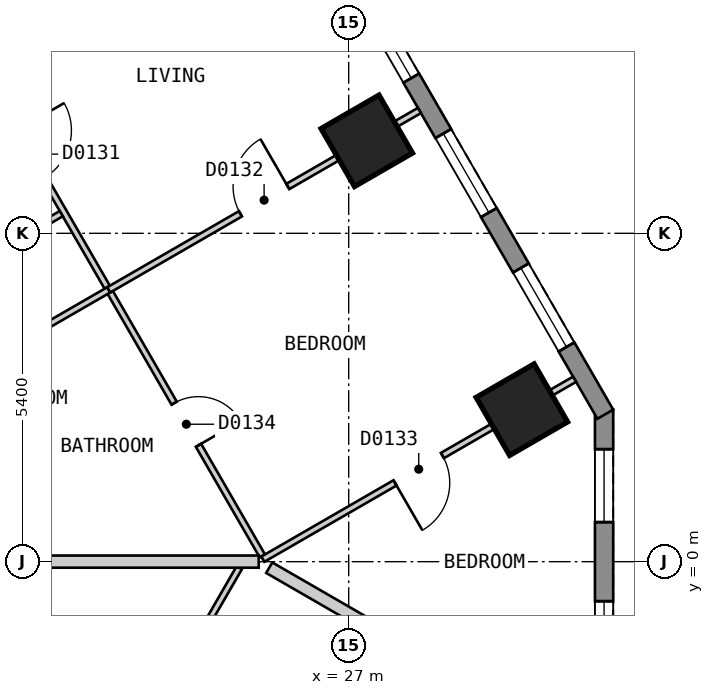
"""IFC4 building model, lengths in metres.
Left out: names, types, materials, properties, quantities, classifications, styles, units other than length and angle.
Written with IfcOpenShell. Run it as: python <this file> out.ifc"""

import sys

from ifc_helpers import new_model, si_unit, direction, frame, frame_2d, origin, origin_2d, place, context, subcontext, project, spatial, polyline, rectangle, outline, extrude, element, fill, save


model = new_model("IFC4")
c1 = context("Model", 3, precision=1e-05, world=origin(), true_north=direction((0.0, 1.0)))
c2 = subcontext(c1, "Body", "Model", "MODEL_VIEW")
j1 = project(units=[si_unit("LENGTHUNIT", "METRE"), si_unit("PLANEANGLEUNIT", "RADIAN")], contexts=[c1])
p1 = place(None, origin())
s1 = spatial("IfcSite", under=j1, at=p1, CompositionType="ELEMENT")
p2 = place(p1, origin())
s2 = spatial("IfcBuilding", under=s1, at=p2, CompositionType="ELEMENT")
p3 = place(p2, frame((0.0, 0.0, 29.4)))
s3 = spatial("IfcBuildingStorey", under=s2, at=p3, CompositionType="ELEMENT", Elevation=29.4)
for number, where, z_axis, x_axis in (
    (1, (29.848, 2.5, 0.0), (0.0, 0.0, 1.0), (-0.5, 0.866, 0.0)),
    (2, (27.297, 6.921, 0.0), (0.0, 0.0, 1.0), (-0.5, 0.866, 0.0)),
):
    element("IfcColumn", number, at=place(p3, frame(where, z_axis=z_axis, x_axis=x_axis)), inside=s3, PredefinedType="COLUMN", context=c2, shape_type="SweptSolid", body=[
        extrude(rectangle(XDim=1.1, YDim=1.1, at=origin_2d()), origin(), (0.0, 0.0, 1.0), 3.0),
    ])
p4 = place(p3, frame((31.2, -2.5, 0.0), z_axis=(0.0, 0.0, 1.0), x_axis=(0.0, 1.0, 0.0)))
e3 = element("IfcWall", 3, at=p4, inside=s3, PredefinedType="SOLIDWALL", context=c2, shape_type="SweptSolid", body=[
    extrude(outline(polyline([(0.0, -0.15), (5.0, -0.15), (4.92, 0.15), (0.08, 0.15), (0.0, -0.15)])), origin(), (0.0, 0.0, 1.0), 2.7),
])
p5 = place(p4, frame((0.65, 0.0, 0.15)))
e4 = element("IfcOpeningElement", 4, at=p5, cuts=e3, PredefinedType="OPENING", context=c2, shape_type="SweptSolid", body=[
    extrude(rectangle(XDim=1.2, YDim=2.1, at=frame_2d((0.6, 1.05))), frame((0.0, 0.16, 0.0), z_axis=(0.0, -1.0, 0.0), x_axis=(1.0, 0.0, 0.0)), (0.0, 0.0, 1.0), 0.32),
])
p6 = place(p4, frame((3.15, 0.0, 0.15)))
e5 = element("IfcOpeningElement", 5, at=p6, cuts=e3, PredefinedType="OPENING", context=c2, shape_type="SweptSolid", body=[
    extrude(rectangle(XDim=1.2, YDim=2.1, at=frame_2d((0.6, 1.05))), frame((0.0, 0.16, 0.0), z_axis=(0.0, -1.0, 0.0), x_axis=(1.0, 0.0, 0.0)), (0.0, 0.0, 1.0), 0.32),
])
p7 = place(p3, frame((31.22, 2.425, 0.0), z_axis=(0.0, 0.0, 1.0), x_axis=(-0.500001938803, 0.866024284413, 0.0)))
e6 = element("IfcWall", 6, at=p7, inside=s3, PredefinedType="SOLIDWALL", context=c2, shape_type="SweptSolid", body=[
    extrude(outline(polyline([(0.0, -0.15), (27.02, -0.15), (26.94, 0.15), (0.08, 0.15), (0.0, -0.15)])), origin(), (0.0, 0.0, 1.0), 2.7),
])
p8 = place(p7, frame((1.277, 0.0, 0.15)))
e7 = element("IfcOpeningElement", 7, at=p8, cuts=e6, PredefinedType="OPENING", context=c2, shape_type="SweptSolid", body=[
    extrude(rectangle(XDim=1.5, YDim=2.1, at=frame_2d((0.75, 1.05))), frame((0.0, 0.16, 0.0), z_axis=(0.0, -1.0, 0.0), x_axis=(1.0, 0.0, 0.0)), (0.0, 0.0, 1.0), 0.32),
])
p9 = place(p7, frame((3.829, 0.0, 0.15)))
e8 = element("IfcOpeningElement", 8, at=p9, cuts=e6, PredefinedType="OPENING", context=c2, shape_type="SweptSolid", body=[
    extrude(rectangle(XDim=1.5, YDim=2.1, at=frame_2d((0.75, 1.05))), frame((0.0, 0.16, 0.0), z_axis=(0.0, -1.0, 0.0), x_axis=(1.0, 0.0, 0.0)), (0.0, 0.0, 1.0), 0.32),
])
p10 = place(p7, frame((6.382, 0.0, 0.15)))
e9 = element("IfcOpeningElement", 9, at=p10, cuts=e6, PredefinedType="OPENING", context=c2, shape_type="SweptSolid", body=[
    extrude(rectangle(XDim=1.5, YDim=2.1, at=frame_2d((0.75, 1.05))), frame((0.0, 0.16, 0.0), z_axis=(0.0, -1.0, 0.0), x_axis=(1.0, 0.0, 0.0)), (0.0, 0.0, 1.0), 0.32),
])
p11 = place(p7, frame((8.933, 0.0, 0.15)))
e10 = element("IfcOpeningElement", 10, at=p11, cuts=e6, PredefinedType="OPENING", context=c2, shape_type="SweptSolid", body=[
    extrude(rectangle(XDim=1.5, YDim=2.1, at=frame_2d((0.75, 1.05))), frame((0.0, 0.16, 0.0), z_axis=(0.0, -1.0, 0.0), x_axis=(1.0, 0.0, 0.0)), (0.0, 0.0, 1.0), 0.32),
])
p12 = place(p7, frame((11.485, 0.0, 0.15)))
e11 = element("IfcOpeningElement", 11, at=p12, cuts=e6, PredefinedType="OPENING", context=c2, shape_type="SweptSolid", body=[
    extrude(rectangle(XDim=1.5, YDim=2.1, at=frame_2d((0.75, 1.05))), frame((0.0, 0.16, 0.0), z_axis=(0.0, -1.0, 0.0), x_axis=(1.0, 0.0, 0.0)), (0.0, 0.0, 1.0), 0.32),
])
p13 = place(p7, frame((14.037, 0.0, 0.15)))
e12 = element("IfcOpeningElement", 12, at=p13, cuts=e6, PredefinedType="OPENING", context=c2, shape_type="SweptSolid", body=[
    extrude(rectangle(XDim=1.5, YDim=2.1, at=frame_2d((0.75, 1.05))), frame((0.0, 0.16, 0.0), z_axis=(0.0, -1.0, 0.0), x_axis=(1.0, 0.0, 0.0)), (0.0, 0.0, 1.0), 0.32),
])
p14 = place(p7, frame((16.589, 0.0, 0.15)))
e13 = element("IfcOpeningElement", 13, at=p14, cuts=e6, PredefinedType="OPENING", context=c2, shape_type="SweptSolid", body=[
    extrude(rectangle(XDim=1.5, YDim=2.1, at=frame_2d((0.75, 1.05))), frame((0.0, 0.16, 0.0), z_axis=(0.0, -1.0, 0.0), x_axis=(1.0, 0.0, 0.0)), (0.0, 0.0, 1.0), 0.32),
])
p15 = place(p7, frame((19.141, 0.0, 0.15)))
e14 = element("IfcOpeningElement", 14, at=p15, cuts=e6, PredefinedType="OPENING", context=c2, shape_type="SweptSolid", body=[
    extrude(rectangle(XDim=1.5, YDim=2.1, at=frame_2d((0.75, 1.05))), frame((0.0, 0.16, 0.0), z_axis=(0.0, -1.0, 0.0), x_axis=(1.0, 0.0, 0.0)), (0.0, 0.0, 1.0), 0.32),
])
p16 = place(p7, frame((21.693, 0.0, 0.15)))
e15 = element("IfcOpeningElement", 15, at=p16, cuts=e6, PredefinedType="OPENING", context=c2, shape_type="SweptSolid", body=[
    extrude(rectangle(XDim=1.5, YDim=2.1, at=frame_2d((0.75, 1.05))), frame((0.0, 0.16, 0.0), z_axis=(0.0, -1.0, 0.0), x_axis=(1.0, 0.0, 0.0)), (0.0, 0.0, 1.0), 0.32),
])
p17 = place(p7, frame((24.244, 0.0, 0.15)))
e16 = element("IfcOpeningElement", 16, at=p17, cuts=e6, PredefinedType="OPENING", context=c2, shape_type="SweptSolid", body=[
    extrude(rectangle(XDim=1.5, YDim=2.1, at=frame_2d((0.75, 1.05))), frame((0.0, 0.16, 0.0), z_axis=(0.0, -1.0, 0.0), x_axis=(1.0, 0.0, 0.0)), (0.0, 0.0, 1.0), 0.32),
])
p18 = place(p3, frame((20.551, 8.805, 0.0), z_axis=(0.0, 0.0, 1.0), x_axis=(0.499984387913, -0.86603441724, 0.0)))
e17 = element("IfcWall", 17, at=p18, inside=s3, PredefinedType="PARTITIONING", context=c2, shape_type="SweptSolid", body=[
    extrude(rectangle(XDim=10.058, YDim=0.1, at=frame_2d((5.029, 0.0))), origin(), (0.0, 0.0, 1.0), 2.7),
])
p19 = place(p18, frame((1.978, 0.0, 0.0)))
e18 = element("IfcOpeningElement", 18, at=p19, cuts=e17, PredefinedType="OPENING", context=c2, shape_type="SweptSolid", body=[
    extrude(rectangle(XDim=0.9, YDim=2.1, at=frame_2d((0.45, 1.05))), frame((0.0, 0.06, 0.0), z_axis=(0.0, -1.0, 0.0), x_axis=(1.0, 0.0, 0.0)), (0.0, 0.0, 1.0), 0.12),
])
p20 = place(p18, frame((7.157, 0.0, 0.0)))
e19 = element("IfcOpeningElement", 19, at=p20, cuts=e17, PredefinedType="OPENING", context=c2, shape_type="SweptSolid", body=[
    extrude(rectangle(XDim=0.8, YDim=2.1, at=frame_2d((0.4, 1.05))), frame((0.0, 0.06, 0.0), z_axis=(0.0, -1.0, 0.0), x_axis=(1.0, 0.0, 0.0)), (0.0, 0.0, 1.0), 0.12),
])
p21 = place(p3, frame((22.797, -4.263, 0.0), z_axis=(0.0, 0.0, 1.0), x_axis=(0.499820637322, 0.866128934112, 0.0)))
e20 = element("IfcWall", 20, at=p21, inside=s3, PredefinedType="PARTITIONING", context=c2, shape_type="SweptSolid", body=[
    extrude(rectangle(XDim=4.807, YDim=0.1, at=frame_2d((2.404, 0.0))), origin(), (0.0, 0.0, 1.0), 2.7),
])
p22 = place(p21, frame((2.037, 0.0, 0.0)))
e21 = element("IfcOpeningElement", 21, at=p22, cuts=e20, PredefinedType="OPENING", context=c2, shape_type="SweptSolid", body=[
    extrude(rectangle(XDim=0.8, YDim=2.1, at=frame_2d((0.4, 1.05))), frame((0.0, 0.06, 0.0), z_axis=(0.0, -1.0, 0.0), x_axis=(1.0, 0.0, 0.0)), (0.0, 0.0, 1.0), 0.12),
])
p23 = place(p3, frame((19.503, 2.421, 0.0), z_axis=(0.0, 0.0, 1.0), x_axis=(0.866083434238, 0.499899474834, 0.0)))
e22 = element("IfcWall", 22, at=p23, inside=s3, PredefinedType="PARTITIONING", context=c2, shape_type="SweptSolid", body=[
    extrude(rectangle(XDim=4.099, YDim=0.1, at=frame_2d((2.049, 0.0))), origin(), (0.0, 0.0, 1.0), 2.7),
])
p24 = place(p3, frame((25.588, 0.041, 0.0), z_axis=(0.0, 0.0, 1.0), x_axis=(0.866113484451, 0.499847408768, 0.0)))
e23 = element("IfcWall", 23, at=p24, inside=s3, PredefinedType="PARTITIONING", context=c2, shape_type="SweptSolid", body=[
    extrude(rectangle(XDim=5.92, YDim=0.1, at=frame_2d((2.96, 0.0))), origin(), (0.0, 0.0, 1.0), 2.7),
])
p25 = place(p24, frame((2.51, 0.0, 0.0)))
e24 = element("IfcOpeningElement", 24, at=p25, cuts=e23, PredefinedType="OPENING", context=c2, shape_type="SweptSolid", body=[
    extrude(rectangle(XDim=0.9, YDim=2.1, at=frame_2d((0.45, 1.05))), frame((0.0, 0.06, 0.0), z_axis=(0.0, -1.0, 0.0), x_axis=(1.0, 0.0, 0.0)), (0.0, 0.0, 1.0), 0.12),
])
p26 = place(p3, frame((18.788, 3.658, 0.0), z_axis=(0.0, 0.0, 1.0), x_axis=(0.860114269096, 0.510101405701, 0.0)))
e25 = element("IfcWall", 25, at=p26, inside=s3, PredefinedType="PARTITIONING", context=c2, shape_type="SweptSolid", body=[
    extrude(rectangle(XDim=4.051, YDim=0.1, at=frame_2d((2.025, 0.0))), origin(), (0.0, 0.0, 1.0), 2.7),
])
p27 = place(p26, frame((1.6, 0.0, 0.0)))
e26 = element("IfcOpeningElement", 26, at=p27, cuts=e25, PredefinedType="OPENING", context=c2, shape_type="SweptSolid", body=[
    extrude(rectangle(XDim=0.8, YDim=2.1, at=frame_2d((0.4, 1.05))), frame((0.0, 0.06, 0.0), z_axis=(0.0, -1.0, 0.0), x_axis=(1.0, 0.0, 0.0)), (0.0, 0.0, 1.0), 0.12),
])
p28 = place(p3, frame((25.693, -0.099, 0.0), z_axis=(0.0, 0.0, 1.0), x_axis=(0.866032775405, -0.499987231761, 0.0)))
e27 = element("IfcWall", 27, at=p28, inside=s3, PredefinedType="PARTITIONING", context=c2, shape_type="SweptSolid", body=[
    extrude(rectangle(XDim=5.8, YDim=0.2, at=frame_2d((2.9, 0.0))), origin(), (0.0, 0.0, 1.0), 2.7),
])
p29 = place(p3, frame((20.784, 0.001, 0.0), z_axis=(0.0, 0.0, 1.0), x_axis=(1.0, 0.0, 0.0)))
e28 = element("IfcWall", 28, at=p29, inside=s3, PredefinedType="PARTITIONING", context=c2, shape_type="SweptSolid", body=[
    extrude(rectangle(XDim=4.736, YDim=0.2, at=frame_2d((2.368, 0.0))), origin(), (0.0, 0.0, 1.0), 2.7),
])
p30 = place(p3, frame((16.95, 6.841, 0.0), z_axis=(0.0, 0.0, 1.0), x_axis=(0.866022959057, 0.500004234368, 0.0)))
e29 = element("IfcWall", 29, at=p30, inside=s3, PredefinedType="PARTITIONING", context=c2, shape_type="SweptSolid", body=[
    extrude(rectangle(XDim=10.0, YDim=0.2, at=frame_2d((5.0, 0.0))), origin(), (0.0, 0.0, 1.0), 2.7),
])
p31 = place(p3, frame((23.053, 4.47, 0.0), z_axis=(0.0, 0.0, 1.0), x_axis=(0.866052608538, 0.499952877023, 0.0)))
e30 = element("IfcWall", 30, at=p31, inside=s3, PredefinedType="PARTITIONING", context=c2, shape_type="SweptSolid", body=[
    extrude(rectangle(XDim=5.9, YDim=0.1, at=frame_2d((2.95, 0.0))), origin(), (0.0, 0.0, 1.0), 2.7),
])
p32 = place(p31, frame((2.501, 0.0, 0.0)))
e31 = element("IfcOpeningElement", 31, at=p32, cuts=e30, PredefinedType="OPENING", context=c2, shape_type="SweptSolid", body=[
    extrude(rectangle(XDim=0.9, YDim=2.1, at=frame_2d((0.45, 1.05))), frame((0.0, 0.06, 0.0), z_axis=(0.0, -1.0, 0.0), x_axis=(1.0, 0.0, 0.0)), (0.0, 0.0, 1.0), 0.12),
])
p33 = place(p5, origin())
e32 = element("IfcWindow", 32, at=p33, inside=s3, PartitioningType="SINGLE_PANEL", PredefinedType="WINDOW", context=c2, shape_type="SweptSolid", body=[
    extrude(rectangle(XDim=1.2, YDim=2.1, at=frame_2d((0.6, 1.05))), frame((0.0, 0.03, 0.0), z_axis=(0.0, -1.0, 0.0), x_axis=(1.0, 0.0, 0.0)), (0.0, 0.0, 1.0), 0.06),
])
fill(e4, e32)
p34 = place(p6, origin())
e33 = element("IfcWindow", 33, at=p34, inside=s3, PartitioningType="SINGLE_PANEL", PredefinedType="WINDOW", context=c2, shape_type="SweptSolid", body=[
    extrude(rectangle(XDim=1.2, YDim=2.1, at=frame_2d((0.6, 1.05))), frame((0.0, 0.03, 0.0), z_axis=(0.0, -1.0, 0.0), x_axis=(1.0, 0.0, 0.0)), (0.0, 0.0, 1.0), 0.06),
])
fill(e5, e33)
p35 = place(p8, origin())
e34 = element("IfcWindow", 34, at=p35, inside=s3, PartitioningType="SINGLE_PANEL", PredefinedType="WINDOW", context=c2, shape_type="SweptSolid", body=[
    extrude(rectangle(XDim=1.5, YDim=2.1, at=frame_2d((0.75, 1.05))), frame((0.0, 0.03, 0.0), z_axis=(0.0, -1.0, 0.0), x_axis=(1.0, 0.0, 0.0)), (0.0, 0.0, 1.0), 0.06),
])
fill(e7, e34)
p36 = place(p9, origin())
e35 = element("IfcWindow", 35, at=p36, inside=s3, PartitioningType="SINGLE_PANEL", PredefinedType="WINDOW", context=c2, shape_type="SweptSolid", body=[
    extrude(rectangle(XDim=1.5, YDim=2.1, at=frame_2d((0.75, 1.05))), frame((0.0, 0.03, 0.0), z_axis=(0.0, -1.0, 0.0), x_axis=(1.0, 0.0, 0.0)), (0.0, 0.0, 1.0), 0.06),
])
fill(e8, e35)
p37 = place(p10, origin())
e36 = element("IfcWindow", 36, at=p37, inside=s3, PartitioningType="SINGLE_PANEL", PredefinedType="WINDOW", context=c2, shape_type="SweptSolid", body=[
    extrude(rectangle(XDim=1.5, YDim=2.1, at=frame_2d((0.75, 1.05))), frame((0.0, 0.03, 0.0), z_axis=(0.0, -1.0, 0.0), x_axis=(1.0, 0.0, 0.0)), (0.0, 0.0, 1.0), 0.06),
])
fill(e9, e36)
p38 = place(p32, origin())
e37 = element("IfcDoor", 37, at=p38, inside=s3, OperationType="SINGLE_SWING_RIGHT", PredefinedType="DOOR", context=c2, shape_type="SweptSolid", body=[
    extrude(rectangle(XDim=0.9, YDim=2.1, at=frame_2d((0.45, 1.05))), frame((0.0, 0.025, 0.0), z_axis=(0.0, -1.0, 0.0), x_axis=(1.0, 0.0, 0.0)), (0.0, 0.0, 1.0), 0.05),
])
fill(e31, e37)
p39 = place(p25, origin())
e38 = element("IfcDoor", 38, at=p39, inside=s3, OperationType="SINGLE_SWING_LEFT", PredefinedType="DOOR", context=c2, shape_type="SweptSolid", body=[
    extrude(rectangle(XDim=0.9, YDim=2.1, at=frame_2d((0.45, 1.05))), frame((0.0, 0.025, 0.0), z_axis=(0.0, -1.0, 0.0), x_axis=(1.0, 0.0, 0.0)), (0.0, 0.0, 1.0), 0.05),
])
fill(e24, e38)
p40 = place(p20, origin())
e39 = element("IfcDoor", 39, at=p40, inside=s3, OperationType="SINGLE_SWING_RIGHT", PredefinedType="DOOR", context=c2, shape_type="SweptSolid", body=[
    extrude(rectangle(XDim=0.8, YDim=2.1, at=frame_2d((0.4, 1.05))), frame((0.0, 0.025, 0.0), z_axis=(0.0, -1.0, 0.0), x_axis=(1.0, 0.0, 0.0)), (0.0, 0.0, 1.0), 0.05),
])
fill(e19, e39)
save(model, sys.argv[1])
